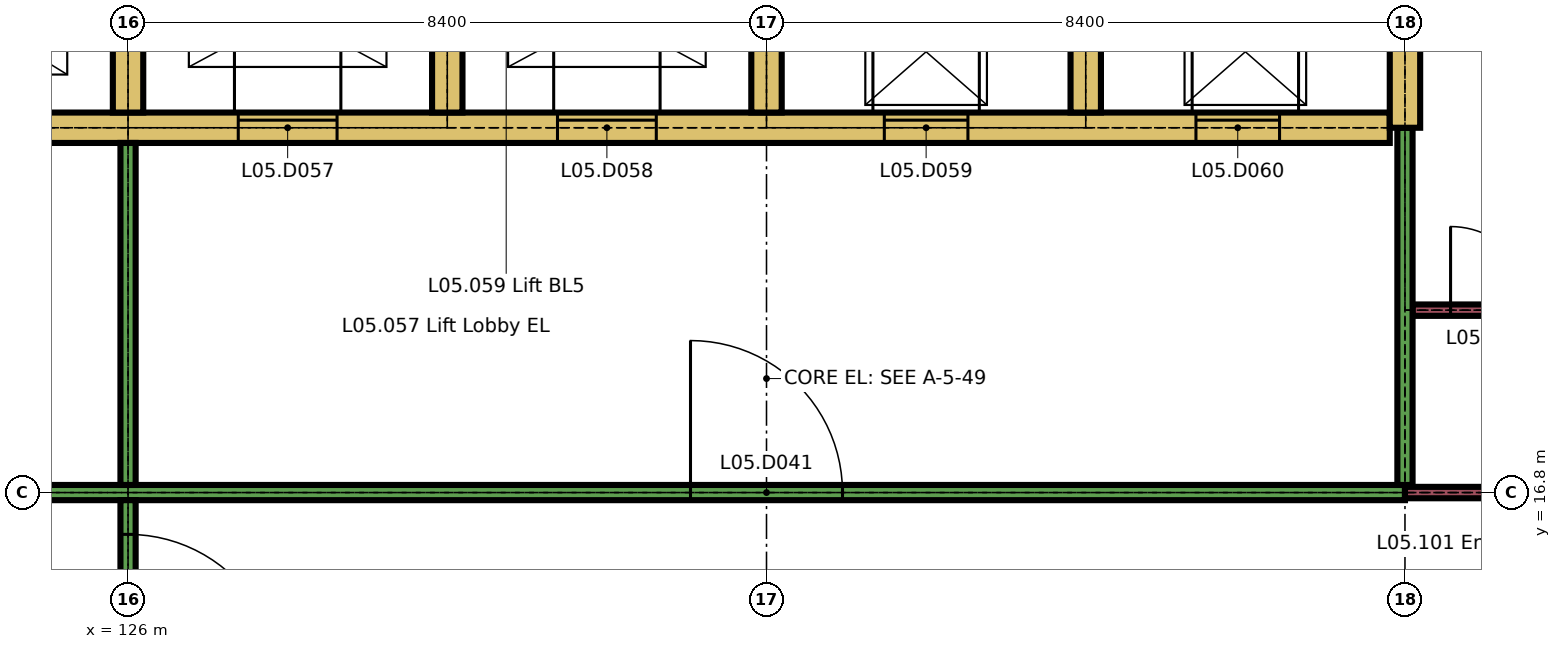
"""IFC4 building model, lengths in metres.
Left out: names, types, materials, properties, quantities, classifications, styles, units other than length and angle.
Written with IfcOpenShell. Run it as: python <this file> out.ifc"""

import sys

from ifc_helpers import new_model, si_unit, direction, frame, frame_2d, origin, place, context, subcontext, project, spatial, rectangle, extrude, element, fill, save


model = new_model("IFC4")
c1 = context("Model", 3, precision=1e-05, world=origin(), true_north=direction((0.0, 1.0)))
c2 = subcontext(c1, "Body", "Model", "MODEL_VIEW")
j1 = project(units=[si_unit("LENGTHUNIT", "METRE"), si_unit("PLANEANGLEUNIT", "RADIAN")], contexts=[c1])
p1 = place(None, origin())
s1 = spatial("IfcSite", under=j1, at=p1, CompositionType="ELEMENT")
p2 = place(p1, origin())
s2 = spatial("IfcBuilding", under=s1, at=p2, CompositionType="ELEMENT")
p3 = place(p2, frame((0.0, 0.0, 22.5)))
s3 = spatial("IfcBuildingStorey", under=s2, at=p3, CompositionType="ELEMENT", Elevation=22.5)
p4 = place(p3, frame((117.7, 16.8, 0.0), z_axis=(0.0, 0.0, 1.0), x_axis=(1.0, 0.0, 0.0)))
e1 = element("IfcWall", 1, at=p4, inside=s3, PredefinedType="PARTITIONING", context=c2, shape_type="SweptSolid", body=[
    extrude(rectangle(XDim=25.1, YDim=0.2, at=frame_2d((12.55, 0.0))), origin(), (0.0, 0.0, 1.0), 3.26),
])
p5 = place(p4, frame((3.3, 0.0, 0.0)))
e2 = element("IfcOpeningElement", 2, at=p5, cuts=e1, PredefinedType="OPENING", context=c2, shape_type="SweptSolid", body=[
    extrude(rectangle(XDim=1.7, YDim=2.4, at=frame_2d((0.85, 1.2))), frame((0.0, 0.11, 0.0), z_axis=(0.0, -1.0, 0.0), x_axis=(1.0, 0.0, 0.0)), (0.0, 0.0, 1.0), 0.22),
])
p6 = place(p4, frame((15.7, 0.0, 0.0)))
e3 = element("IfcOpeningElement", 3, at=p6, cuts=e1, PredefinedType="OPENING", context=c2, shape_type="SweptSolid", body=[
    extrude(rectangle(XDim=2.0, YDim=2.4, at=frame_2d((1.0, 1.2))), frame((0.0, 0.11, 0.0), z_axis=(0.0, -1.0, 0.0), x_axis=(1.0, 0.0, 0.0)), (0.0, 0.0, 1.0), 0.22),
])
p7 = place(p3, frame((142.8, 16.8, 0.0), z_axis=(0.0, 0.0, 1.0), x_axis=(1.0, 0.0, 0.0)))
e4 = element("IfcWall", 4, at=p7, inside=s3, PredefinedType="PARTITIONING", context=c2, shape_type="SweptSolid", body=[
    extrude(rectangle(XDim=4.275, YDim=0.15, at=frame_2d((2.137, 0.0))), origin(), (0.0, 0.0, 1.0), 3.26),
])
p8 = place(p7, frame((2.45, 0.0, 0.0)))
e5 = element("IfcOpeningElement", 5, at=p8, cuts=e4, PredefinedType="OPENING", context=c2, shape_type="SweptSolid", body=[
    extrude(rectangle(XDim=1.5, YDim=2.4, at=frame_2d((0.75, 1.2))), frame((0.0, 0.085, 0.0), z_axis=(0.0, -1.0, 0.0), x_axis=(1.0, 0.0, 0.0)), (0.0, 0.0, 1.0), 0.17),
])
p9 = place(p3, frame((142.9, 19.2, 0.0), z_axis=(0.0, 0.0, 1.0), x_axis=(1.0, 0.0, 0.0)))
e6 = element("IfcWall", 6, at=p9, inside=s3, PredefinedType="PARTITIONING", context=c2, shape_type="SweptSolid", body=[
    extrude(rectangle(XDim=2.175, YDim=0.15, at=frame_2d((1.087, 0.0))), origin(), (0.0, 0.0, 1.0), 3.26),
])
p10 = place(p9, frame((0.5, 0.0, 0.0)))
e7 = element("IfcOpeningElement", 7, at=p10, cuts=e6, PredefinedType="OPENING", context=c2, shape_type="SweptSolid", body=[
    extrude(rectangle(XDim=1.1, YDim=2.1, at=frame_2d((0.55, 1.05))), frame((0.0, 0.085, 0.0), z_axis=(0.0, -1.0, 0.0), x_axis=(1.0, 0.0, 0.0)), (0.0, 0.0, 1.0), 0.17),
])
p11 = place(p3, frame((117.8, 21.6, 0.0), z_axis=(0.0, 0.0, 1.0), x_axis=(1.0, 0.0, 0.0)))
e8 = element("IfcWall", 8, at=p11, inside=s3, PredefinedType="SHEAR", context=c2, shape_type="SweptSolid", body=[
    extrude(rectangle(XDim=24.8, YDim=0.4, at=frame_2d((12.4, 0.0))), origin(), (0.0, 0.0, 1.0), 3.26),
])
p12 = place(p11, frame((1.35, 0.0, 0.0)))
e9 = element("IfcOpeningElement", 9, at=p12, cuts=e8, PredefinedType="OPENING", context=c2, shape_type="SweptSolid", body=[
    extrude(rectangle(XDim=1.3, YDim=2.1, at=frame_2d((0.65, 1.05))), frame((0.0, 0.21, 0.0), z_axis=(0.0, -1.0, 0.0), x_axis=(1.0, 0.0, 0.0)), (0.0, 0.0, 1.0), 0.42),
])
p13 = place(p11, frame((5.45, 0.0, 0.0)))
e10 = element("IfcOpeningElement", 10, at=p13, cuts=e8, PredefinedType="OPENING", context=c2, shape_type="SweptSolid", body=[
    extrude(rectangle(XDim=1.3, YDim=2.1, at=frame_2d((0.65, 1.05))), frame((0.0, 0.21, 0.0), z_axis=(0.0, -1.0, 0.0), x_axis=(1.0, 0.0, 0.0)), (0.0, 0.0, 1.0), 0.42),
])
p14 = place(p11, frame((9.65, 0.0, 0.0)))
e11 = element("IfcOpeningElement", 11, at=p14, cuts=e8, PredefinedType="OPENING", context=c2, shape_type="SweptSolid", body=[
    extrude(rectangle(XDim=1.3, YDim=2.1, at=frame_2d((0.65, 1.05))), frame((0.0, 0.21, 0.0), z_axis=(0.0, -1.0, 0.0), x_axis=(1.0, 0.0, 0.0)), (0.0, 0.0, 1.0), 0.42),
])
p15 = place(p11, frame((13.85, 0.0, 0.0)))
e12 = element("IfcOpeningElement", 12, at=p15, cuts=e8, PredefinedType="OPENING", context=c2, shape_type="SweptSolid", body=[
    extrude(rectangle(XDim=1.3, YDim=2.1, at=frame_2d((0.65, 1.05))), frame((0.0, 0.21, 0.0), z_axis=(0.0, -1.0, 0.0), x_axis=(1.0, 0.0, 0.0)), (0.0, 0.0, 1.0), 0.42),
])
p16 = place(p11, frame((18.15, 0.0, 0.0)))
e13 = element("IfcOpeningElement", 13, at=p16, cuts=e8, PredefinedType="OPENING", context=c2, shape_type="SweptSolid", body=[
    extrude(rectangle(XDim=1.1, YDim=2.1, at=frame_2d((0.55, 1.05))), frame((0.0, 0.21, 0.0), z_axis=(0.0, -1.0, 0.0), x_axis=(1.0, 0.0, 0.0)), (0.0, 0.0, 1.0), 0.42),
])
p17 = place(p11, frame((22.25, 0.0, 0.0)))
e14 = element("IfcOpeningElement", 14, at=p17, cuts=e8, PredefinedType="OPENING", context=c2, shape_type="SweptSolid", body=[
    extrude(rectangle(XDim=1.1, YDim=2.1, at=frame_2d((0.55, 1.05))), frame((0.0, 0.21, 0.0), z_axis=(0.0, -1.0, 0.0), x_axis=(1.0, 0.0, 0.0)), (0.0, 0.0, 1.0), 0.42),
])
p18 = place(p3, frame((126.0, 8.775, 0.0), z_axis=(0.0, 0.0, 1.0), x_axis=(0.0, 1.0, 0.0)))
e15 = element("IfcWall", 15, at=p18, inside=s3, PredefinedType="PARTITIONING", context=c2, shape_type="SweptSolid", body=[
    extrude(rectangle(XDim=7.925, YDim=0.2, at=frame_2d((3.962, 0.0))), origin(), (0.0, 0.0, 1.0), 3.26),
])
p19 = place(p18, frame((0.312, 0.0, 0.0)))
e16 = element("IfcOpeningElement", 16, at=p19, cuts=e15, PredefinedType="OPENING", context=c2, shape_type="SweptSolid", body=[
    extrude(rectangle(XDim=2.0, YDim=2.4, at=frame_2d((1.0, 1.2))), frame((0.0, 0.11, 0.0), z_axis=(0.0, -1.0, 0.0), x_axis=(1.0, 0.0, 0.0)), (0.0, 0.0, 1.0), 0.22),
])
p20 = place(p18, frame((5.475, 0.0, 0.0)))
e17 = element("IfcOpeningElement", 17, at=p20, cuts=e15, PredefinedType="OPENING", context=c2, shape_type="SweptSolid", body=[
    extrude(rectangle(XDim=2.0, YDim=2.4, at=frame_2d((1.0, 1.2))), frame((0.0, 0.11, 0.0), z_axis=(0.0, -1.0, 0.0), x_axis=(1.0, 0.0, 0.0)), (0.0, 0.0, 1.0), 0.22),
])
p21 = place(p3, frame((126.0, 16.9, 0.0), z_axis=(0.0, 0.0, 1.0), x_axis=(0.0, 1.0, 0.0)))
e18 = element("IfcWall", 18, at=p21, inside=s3, PredefinedType="PARTITIONING", context=c2, shape_type="SweptSolid", body=[
    extrude(rectangle(XDim=4.5, YDim=0.2, at=frame_2d((2.25, 0.0))), origin(), (0.0, 0.0, 1.0), 3.26),
])
for number, where, z_axis, x_axis in (
    (19, (126.0, 21.8, 0.0), (0.0, 0.0, 1.0), (0.0, 1.0, 0.0)),
    (20, (130.2, 21.8, 0.0), (0.0, 0.0, 1.0), (0.0, 1.0, 0.0)),
    (21, (134.4, 21.8, 0.0), (0.0, 0.0, 1.0), (0.0, 1.0, 0.0)),
    (22, (138.6, 21.8, 0.0), (0.0, 0.0, 1.0), (0.0, 1.0, 0.0)),
):
    element("IfcWall", number, at=place(p3, frame(where, z_axis=z_axis, x_axis=x_axis)), inside=s3, PredefinedType="SHEAR", context=c2, shape_type="SweptSolid", body=[
        extrude(rectangle(XDim=3.25, YDim=0.4, at=frame_2d((1.625, 0.0))), origin(), (0.0, 0.0, 1.0), 3.26),
    ])
p22 = place(p3, frame((142.8, 16.9, 0.0), z_axis=(0.0, 0.0, 1.0), x_axis=(0.0, 1.0, 0.0)))
e23 = element("IfcWall", 23, at=p22, inside=s3, PredefinedType="PARTITIONING", context=c2, shape_type="SweptSolid", body=[
    extrude(rectangle(XDim=4.7, YDim=0.2, at=frame_2d((2.35, 0.0))), origin(), (0.0, 0.0, 1.0), 3.26),
])
p23 = place(p3, frame((142.8, 21.6, 0.0), z_axis=(0.0, 0.0, 1.0), x_axis=(0.0, 1.0, 0.0)))
e24 = element("IfcWall", 24, at=p23, inside=s3, PredefinedType="SHEAR", context=c2, shape_type="SweptSolid", body=[
    extrude(rectangle(XDim=3.45, YDim=0.4, at=frame_2d((1.725, 0.0))), origin(), (0.0, 0.0, 1.0), 3.26),
])
p24 = place(p6, origin())
e25 = element("IfcDoor", 25, at=p24, inside=s3, OperationType="SINGLE_SWING_RIGHT", PredefinedType="DOOR", context=c2, shape_type="SweptSolid", body=[
    extrude(rectangle(XDim=2.0, YDim=2.4, at=frame_2d((1.0, 1.2))), frame((0.0, 0.03, 0.0), z_axis=(0.0, -1.0, 0.0), x_axis=(1.0, 0.0, 0.0)), (0.0, 0.0, 1.0), 0.06),
])
fill(e3, e25)
p25 = place(p10, origin())
e26 = element("IfcDoor", 26, at=p25, inside=s3, OperationType="SINGLE_SWING_RIGHT", PredefinedType="DOOR", context=c2, shape_type="SweptSolid", body=[
    extrude(rectangle(XDim=1.1, YDim=2.1, at=frame_2d((0.55, 1.05))), frame((0.0, 0.025, 0.0), z_axis=(0.0, -1.0, 0.0), x_axis=(1.0, 0.0, 0.0)), (0.0, 0.0, 1.0), 0.05),
])
fill(e7, e26)
p26 = place(p14, origin())
e27 = element("IfcDoor", 27, at=p26, inside=s3, OperationType="SLIDING_TO_LEFT", PredefinedType="DOOR", context=c2, shape_type="SweptSolid", body=[
    extrude(rectangle(XDim=1.3, YDim=2.1, at=frame_2d((0.65, 1.05))), frame((0.0, 0.025, 0.0), z_axis=(0.0, -1.0, 0.0), x_axis=(1.0, 0.0, 0.0)), (0.0, 0.0, 1.0), 0.05),
])
fill(e11, e27)
p27 = place(p15, origin())
e28 = element("IfcDoor", 28, at=p27, inside=s3, OperationType="SLIDING_TO_LEFT", PredefinedType="DOOR", context=c2, shape_type="SweptSolid", body=[
    extrude(rectangle(XDim=1.3, YDim=2.1, at=frame_2d((0.65, 1.05))), frame((0.0, 0.025, 0.0), z_axis=(0.0, -1.0, 0.0), x_axis=(1.0, 0.0, 0.0)), (0.0, 0.0, 1.0), 0.05),
])
fill(e12, e28)
p28 = place(p16, origin())
e29 = element("IfcDoor", 29, at=p28, inside=s3, OperationType="SLIDING_TO_LEFT", PredefinedType="DOOR", context=c2, shape_type="SweptSolid", body=[
    extrude(rectangle(XDim=1.1, YDim=2.1, at=frame_2d((0.55, 1.05))), frame((0.0, 0.025, 0.0), z_axis=(0.0, -1.0, 0.0), x_axis=(1.0, 0.0, 0.0)), (0.0, 0.0, 1.0), 0.05),
])
fill(e13, e29)
p29 = place(p17, origin())
e30 = element("IfcDoor", 30, at=p29, inside=s3, OperationType="SLIDING_TO_LEFT", PredefinedType="DOOR", context=c2, shape_type="SweptSolid", body=[
    extrude(rectangle(XDim=1.1, YDim=2.1, at=frame_2d((0.55, 1.05))), frame((0.0, 0.025, 0.0), z_axis=(0.0, -1.0, 0.0), x_axis=(1.0, 0.0, 0.0)), (0.0, 0.0, 1.0), 0.05),
])
fill(e14, e30)
p30 = place(p20, origin())
e31 = element("IfcDoor", 31, at=p30, inside=s3, OperationType="SINGLE_SWING_LEFT", PredefinedType="DOOR", context=c2, shape_type="SweptSolid", body=[
    extrude(rectangle(XDim=2.0, YDim=2.4, at=frame_2d((1.0, 1.2))), frame((0.0, 0.03, 0.0), z_axis=(0.0, -1.0, 0.0), x_axis=(1.0, 0.0, 0.0)), (0.0, 0.0, 1.0), 0.06),
])
fill(e17, e31)
save(model, sys.argv[1])
